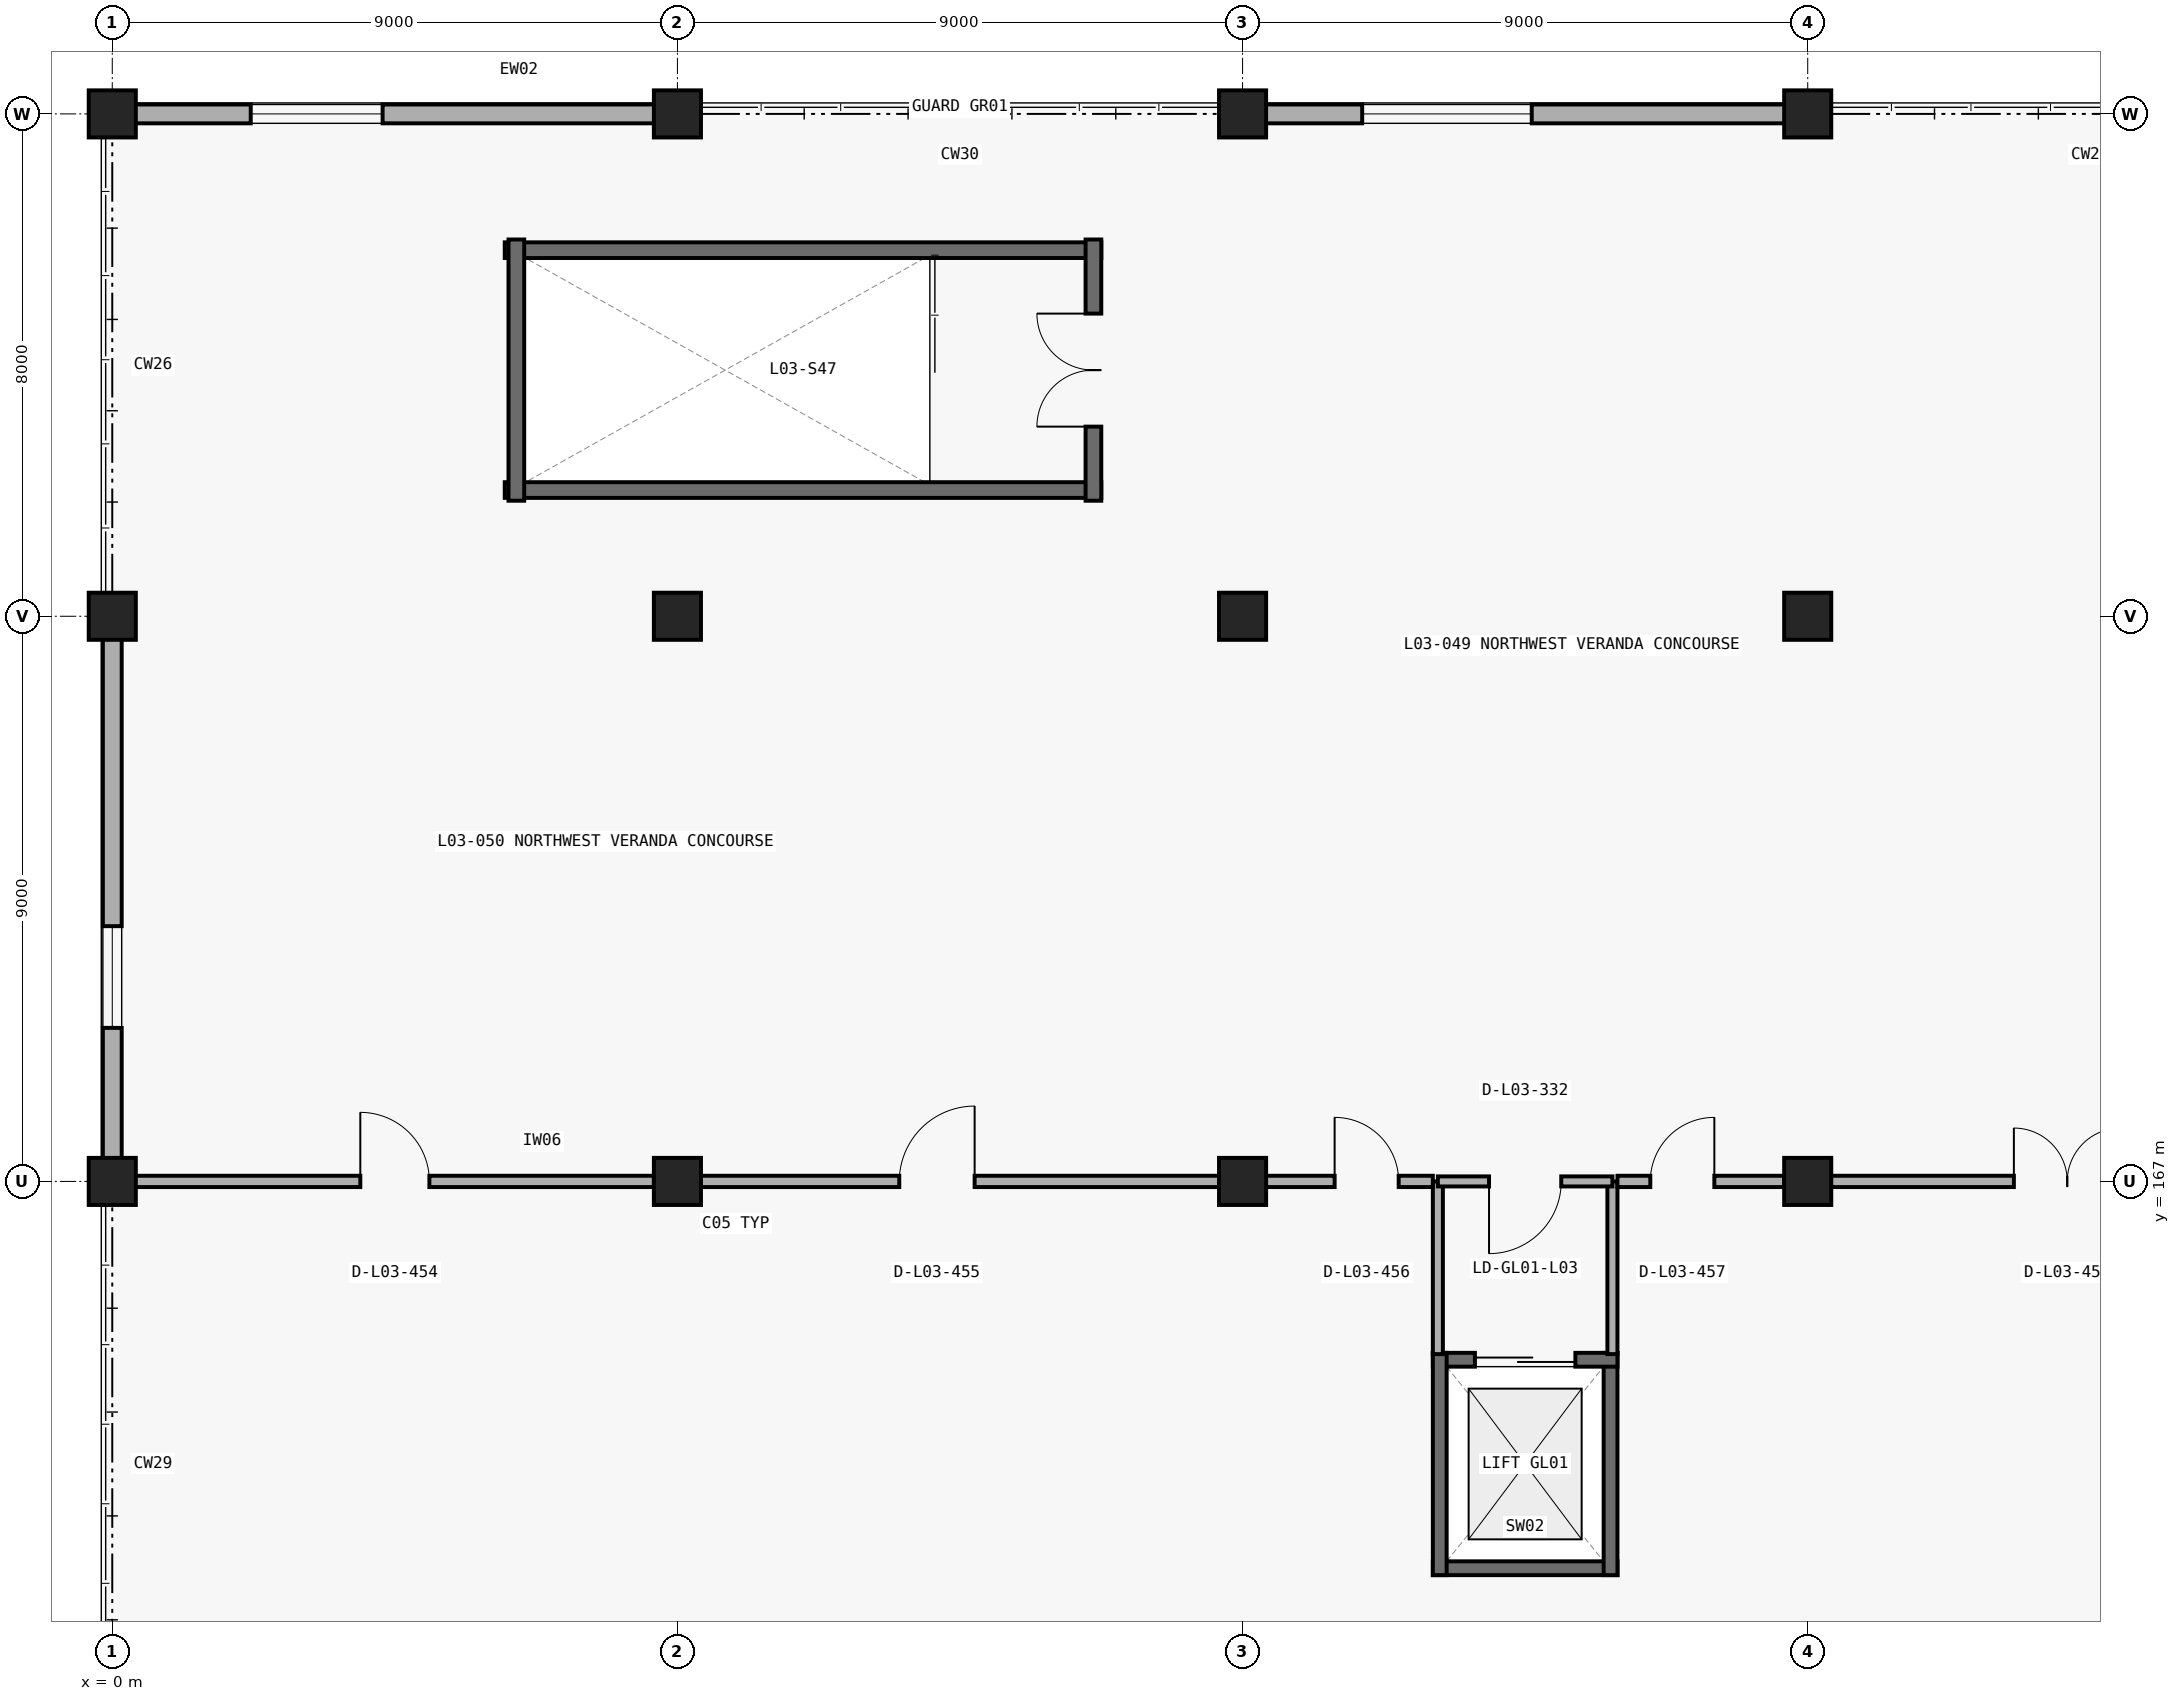
"""IFC4 building model, lengths in metres.
Left out: names, types, materials, properties, quantities, classifications, styles, units other than length and angle.
Written with IfcOpenShell. Run it as: python <this file> out.ifc"""

import sys

from ifc_helpers import new_model, si_unit, direction, frame, frame_2d, origin, origin_2d, place, context, subcontext, project, spatial, rectangle, extrude, element, fill, save


model = new_model("IFC4")
c1 = context("Model", 3, precision=1e-05, world=origin(), true_north=direction((0.0, 1.0)))
c2 = subcontext(c1, "Body", "Model", "MODEL_VIEW")
j1 = project(units=[si_unit("LENGTHUNIT", "METRE"), si_unit("PLANEANGLEUNIT", "RADIAN")], contexts=[c1])
p1 = place(None, origin())
s1 = spatial("IfcSite", under=j1, at=p1, CompositionType="ELEMENT")
p2 = place(p1, origin())
s2 = spatial("IfcBuilding", under=s1, at=p2, CompositionType="ELEMENT")
p3 = place(p2, frame((0.0, 0.0, 15.0)))
s3 = spatial("IfcBuildingStorey", under=s2, at=p3, CompositionType="ELEMENT", Elevation=15.0)
for number, where, z_axis, x_axis in (
    (1, (0.0, 167.0, 0.0), (0.0, 0.0, 1.0), (1.0, 0.0, 0.0)),
    (2, (0.0, 176.0, 0.0), (0.0, 0.0, 1.0), (1.0, 0.0, 0.0)),
    (3, (0.0, 184.0, 0.0), (0.0, 0.0, 1.0), (1.0, 0.0, 0.0)),
    (4, (9.0, 167.0, 0.0), (0.0, 0.0, 1.0), (1.0, 0.0, 0.0)),
    (5, (9.0, 176.0, 0.0), (0.0, 0.0, 1.0), (1.0, 0.0, 0.0)),
    (6, (9.0, 184.0, 0.0), (0.0, 0.0, 1.0), (1.0, 0.0, 0.0)),
    (7, (18.0, 167.0, 0.0), (0.0, 0.0, 1.0), (1.0, 0.0, 0.0)),
    (8, (18.0, 176.0, 0.0), (0.0, 0.0, 1.0), (1.0, 0.0, 0.0)),
    (9, (18.0, 184.0, 0.0), (0.0, 0.0, 1.0), (1.0, 0.0, 0.0)),
    (10, (27.0, 167.0, 0.0), (0.0, 0.0, 1.0), (1.0, 0.0, 0.0)),
    (11, (27.0, 176.0, 0.0), (0.0, 0.0, 1.0), (1.0, 0.0, 0.0)),
    (12, (27.0, 184.0, 0.0), (0.0, 0.0, 1.0), (1.0, 0.0, 0.0)),
):
    element("IfcColumn", number, at=place(p3, frame(where, z_axis=z_axis, x_axis=x_axis)), inside=s3, PredefinedType="COLUMN", context=c2, shape_type="SweptSolid", body=[
        extrude(rectangle(XDim=0.75, YDim=0.75, at=origin_2d()), origin(), (0.0, 0.0, 1.0), 4.8),
    ])
p4 = place(p3, frame((0.0, 167.35, 0.0), z_axis=(0.0, 0.0, 1.0), x_axis=(0.0, 1.0, 0.0)))
e13 = element("IfcWall", 13, at=p4, inside=s3, PredefinedType="STANDARD", context=c2, shape_type="SweptSolid", body=[
    extrude(rectangle(XDim=8.3, YDim=0.3, at=frame_2d((4.15, 0.0))), origin(), (0.0, 0.0, 1.0), 3.857),
])
p5 = place(p4, frame((2.095, 0.0, 0.95)))
e14 = element("IfcOpeningElement", 14, at=p5, cuts=e13, PredefinedType="OPENING", context=c2, shape_type="SweptSolid", body=[
    extrude(rectangle(XDim=1.62, YDim=2.12, at=frame_2d((0.81, 1.06))), frame((0.0, 0.16, 0.0), z_axis=(0.0, -1.0, 0.0), x_axis=(1.0, 0.0, 0.0)), (0.0, 0.0, 1.0), 0.32),
])
p6 = place(p3, frame((0.35, 184.0, 0.0), z_axis=(0.0, 0.0, 1.0), x_axis=(1.0, 0.0, 0.0)))
e15 = element("IfcWall", 15, at=p6, inside=s3, PredefinedType="STANDARD", context=c2, shape_type="SweptSolid", body=[
    extrude(rectangle(XDim=8.3, YDim=0.3, at=frame_2d((4.15, 0.0))), origin(), (0.0, 0.0, 1.0), 3.823),
])
p7 = place(p6, frame((1.855, 0.0, 0.95)))
e16 = element("IfcOpeningElement", 16, at=p7, cuts=e15, PredefinedType="OPENING", context=c2, shape_type="SweptSolid", body=[
    extrude(rectangle(XDim=2.1, YDim=2.1, at=frame_2d((1.05, 1.05))), frame((0.0, 0.16, 0.0), z_axis=(0.0, -1.0, 0.0), x_axis=(1.0, 0.0, 0.0)), (0.0, 0.0, 1.0), 0.32),
])
p8 = place(p3, frame((18.35, 184.0, 0.0), z_axis=(0.0, 0.0, 1.0), x_axis=(1.0, 0.0, 0.0)))
e17 = element("IfcWall", 17, at=p8, inside=s3, PredefinedType="STANDARD", context=c2, shape_type="SweptSolid", body=[
    extrude(rectangle(XDim=8.3, YDim=0.3, at=frame_2d((4.15, 0.0))), origin(), (0.0, 0.0, 1.0), 3.823),
])
p9 = place(p8, frame((1.555, 0.0, 0.95)))
e18 = element("IfcOpeningElement", 18, at=p9, cuts=e17, PredefinedType="OPENING", context=c2, shape_type="SweptSolid", body=[
    extrude(rectangle(XDim=2.7, YDim=2.25, at=frame_2d((1.35, 1.125))), frame((0.0, 0.16, 0.0), z_axis=(0.0, -1.0, 0.0), x_axis=(1.0, 0.0, 0.0)), (0.0, 0.0, 1.0), 0.32),
])
for number, where, z_axis, x_axis in (
    (19, (15.75, 181.83, 0.0), (0.0, 0.0, 1.0), (-1.0, 0.0, 0.0)),
    (20, (6.25, 178.01, 0.0), (0.0, 0.0, 1.0), (1.0, 0.0, 0.0)),
):
    element("IfcWall", number, at=place(p3, frame(where, z_axis=z_axis, x_axis=x_axis)), inside=s3, PredefinedType="SHEAR", context=c2, shape_type="SweptSolid", body=[
        extrude(rectangle(XDim=9.5, YDim=0.25, at=frame_2d((4.75, 0.0))), origin(), (0.0, 0.0, 1.0), 4.54),
    ])
p10 = place(p3, frame((15.625, 177.84, 0.0), z_axis=(0.0, 0.0, 1.0), x_axis=(0.0, 1.0, 0.0)))
e21 = element("IfcWall", 21, at=p10, inside=s3, PredefinedType="SHEAR", context=c2, shape_type="SweptSolid", body=[
    extrude(rectangle(XDim=4.16, YDim=0.25, at=frame_2d((2.08, 0.0))), origin(), (0.0, 0.0, 1.0), 4.54),
])
p11 = place(p10, frame((1.18, 0.0, 0.0)))
e22 = element("IfcOpeningElement", 22, at=p11, cuts=e21, PredefinedType="OPENING", context=c2, shape_type="SweptSolid", body=[
    extrude(rectangle(XDim=1.8, YDim=2.25, at=frame_2d((0.9, 1.125))), frame((0.0, 0.135, 0.0), z_axis=(0.0, -1.0, 0.0), x_axis=(1.0, 0.0, 0.0)), (0.0, 0.0, 1.0), 0.27),
])
p12 = place(p3, frame((6.435, 182.0, 0.0), z_axis=(0.0, 0.0, 1.0), x_axis=(0.0, -1.0, 0.0)))
e23 = element("IfcWall", 23, at=p12, inside=s3, PredefinedType="SHEAR", context=c2, shape_type="SweptSolid", body=[
    extrude(rectangle(XDim=4.16, YDim=0.25, at=frame_2d((2.08, 0.0))), origin(), (0.0, 0.0, 1.0), 4.54),
])
p13 = place(p3, frame((21.03, 160.84, 0.0), z_axis=(0.0, 0.0, 1.0), x_axis=(1.0, 0.0, 0.0)))
e24 = element("IfcWall", 24, at=p13, inside=s3, PredefinedType="SHEAR", context=c2, shape_type="SweptSolid", body=[
    extrude(rectangle(XDim=2.94, YDim=0.22, at=frame_2d((1.47, 0.0))), origin(), (0.0, 0.0, 1.0), 4.54),
])
p14 = place(p3, frame((23.86, 160.73, 0.0), z_axis=(0.0, 0.0, 1.0), x_axis=(0.0, 1.0, 0.0)))
e25 = element("IfcWall", 25, at=p14, inside=s3, PredefinedType="SHEAR", context=c2, shape_type="SweptSolid", body=[
    extrude(rectangle(XDim=3.54, YDim=0.22, at=frame_2d((1.77, 0.0))), origin(), (0.0, 0.0, 1.0), 4.54),
])
p15 = place(p3, frame((23.97, 164.16, 0.0), z_axis=(0.0, 0.0, 1.0), x_axis=(-1.0, 0.0, 0.0)))
e26 = element("IfcWall", 26, at=p15, inside=s3, PredefinedType="SHEAR", context=c2, shape_type="SweptSolid", body=[
    extrude(rectangle(XDim=2.94, YDim=0.22, at=frame_2d((1.47, 0.0))), origin(), (0.0, 0.0, 1.0), 4.54),
])
p16 = place(p15, frame((0.67, 0.0, 0.0)))
e27 = element("IfcOpeningElement", 27, at=p16, cuts=e26, PredefinedType="OPENING", context=c2, shape_type="SweptSolid", body=[
    extrude(rectangle(XDim=1.6, YDim=2.3, at=frame_2d((0.8, 1.15))), frame((0.0, 0.12, 0.0), z_axis=(0.0, -1.0, 0.0), x_axis=(1.0, 0.0, 0.0)), (0.0, 0.0, 1.0), 0.24),
])
p17 = place(p3, frame((21.14, 164.27, 0.0), z_axis=(0.0, 0.0, 1.0), x_axis=(0.0, -1.0, 0.0)))
e28 = element("IfcWall", 28, at=p17, inside=s3, PredefinedType="SHEAR", context=c2, shape_type="SweptSolid", body=[
    extrude(rectangle(XDim=3.54, YDim=0.22, at=frame_2d((1.77, 0.0))), origin(), (0.0, 0.0, 1.0), 4.54),
])
for number, where, z_axis, x_axis in (
    (29, (23.89, 164.25, 0.0), (0.0, 0.0, 1.0), (0.0, 1.0, 0.0)),
    (30, (21.11, 164.25, 0.0), (0.0, 0.0, 1.0), (0.0, 1.0, 0.0)),
):
    element("IfcWall", number, at=place(p3, frame(where, z_axis=z_axis, x_axis=x_axis)), inside=s3, PredefinedType="PARTITIONING", context=c2, shape_type="SweptSolid", body=[
        extrude(rectangle(XDim=2.75, YDim=0.16, at=frame_2d((1.375, 0.0))), origin(), (0.0, 0.0, 1.0), 3.823),
    ])
p18 = place(p3, frame((23.89, 167.0, 0.0), z_axis=(0.0, 0.0, 1.0), x_axis=(-1.0, 0.0, 0.0)))
e31 = element("IfcWall", 31, at=p18, inside=s3, PredefinedType="PARTITIONING", context=c2, shape_type="SweptSolid", body=[
    extrude(rectangle(XDim=2.78, YDim=0.16, at=frame_2d((1.39, 0.0))), origin(), (0.0, 0.0, 1.0), 3.823),
])
p19 = place(p18, frame((0.815, 0.0, 0.0)))
e32 = element("IfcOpeningElement", 32, at=p19, cuts=e31, PredefinedType="OPENING", context=c2, shape_type="SweptSolid", body=[
    extrude(rectangle(XDim=1.15, YDim=2.2, at=frame_2d((0.575, 1.1))), frame((0.0, 0.09, 0.0), z_axis=(0.0, -1.0, 0.0), x_axis=(1.0, 0.0, 0.0)), (0.0, 0.0, 1.0), 0.18),
])
p20 = place(p3, frame((0.36, 167.0, 0.0), z_axis=(0.0, 0.0, 1.0), x_axis=(1.0, 0.0, 0.0)))
e33 = element("IfcWall", 33, at=p20, inside=s3, PredefinedType="PARTITIONING", context=c2, shape_type="SweptSolid", body=[
    extrude(rectangle(XDim=8.28, YDim=0.18, at=frame_2d((4.14, 0.0))), origin(), (0.0, 0.0, 1.0), 3.823),
])
p21 = place(p20, frame((3.59, 0.0, 0.0)))
e34 = element("IfcOpeningElement", 34, at=p21, cuts=e33, PredefinedType="OPENING", context=c2, shape_type="SweptSolid", body=[
    extrude(rectangle(XDim=1.1, YDim=2.15, at=frame_2d((0.55, 1.075))), frame((0.0, 0.1, 0.0), z_axis=(0.0, -1.0, 0.0), x_axis=(1.0, 0.0, 0.0)), (0.0, 0.0, 1.0), 0.2),
])
p22 = place(p3, frame((8.625, 167.0, 0.0), z_axis=(0.0, 0.0, 1.0), x_axis=(1.0, 0.0, 0.0)))
e35 = element("IfcWall", 35, at=p22, inside=s3, PredefinedType="PARTITIONING", context=c2, shape_type="SweptSolid", body=[
    extrude(rectangle(XDim=9.015, YDim=0.18, at=frame_2d((4.507, 0.0))), origin(), (0.0, 0.0, 1.0), 3.823),
])
p23 = place(p22, frame((3.908, 0.0, 0.0)))
e36 = element("IfcOpeningElement", 36, at=p23, cuts=e35, PredefinedType="OPENING", context=c2, shape_type="SweptSolid", body=[
    extrude(rectangle(XDim=1.2, YDim=2.25, at=frame_2d((0.6, 1.125))), frame((0.0, 0.1, 0.0), z_axis=(0.0, -1.0, 0.0), x_axis=(1.0, 0.0, 0.0)), (0.0, 0.0, 1.0), 0.2),
])
p24 = place(p3, frame((17.625, 167.0, 0.0), z_axis=(0.0, 0.0, 1.0), x_axis=(1.0, 0.0, 0.0)))
e37 = element("IfcWall", 37, at=p24, inside=s3, PredefinedType="PARTITIONING", context=c2, shape_type="SweptSolid", body=[
    extrude(rectangle(XDim=3.405, YDim=0.18, at=frame_2d((1.703, 0.0))), origin(), (0.0, 0.0, 1.0), 3.823),
])
p25 = place(p24, frame((1.841, 0.0, 0.0)))
e38 = element("IfcOpeningElement", 38, at=p25, cuts=e37, PredefinedType="OPENING", context=c2, shape_type="SweptSolid", body=[
    extrude(rectangle(XDim=1.02, YDim=2.2, at=frame_2d((0.51, 1.1))), frame((0.0, 0.1, 0.0), z_axis=(0.0, -1.0, 0.0), x_axis=(1.0, 0.0, 0.0)), (0.0, 0.0, 1.0), 0.2),
])
p26 = place(p3, frame((23.97, 167.0, 0.0), z_axis=(0.0, 0.0, 1.0), x_axis=(1.0, 0.0, 0.0)))
e39 = element("IfcWall", 39, at=p26, inside=s3, PredefinedType="PARTITIONING", context=c2, shape_type="SweptSolid", body=[
    extrude(rectangle(XDim=2.67, YDim=0.18, at=frame_2d((1.335, 0.0))), origin(), (0.0, 0.0, 1.0), 3.823),
])
p27 = place(p26, frame((0.523, 0.0, 0.0)))
e40 = element("IfcOpeningElement", 40, at=p27, cuts=e39, PredefinedType="OPENING", context=c2, shape_type="SweptSolid", body=[
    extrude(rectangle(XDim=1.02, YDim=2.2, at=frame_2d((0.51, 1.1))), frame((0.0, 0.1, 0.0), z_axis=(0.0, -1.0, 0.0), x_axis=(1.0, 0.0, 0.0)), (0.0, 0.0, 1.0), 0.2),
])
p28 = place(p3, frame((26.625, 167.0, 0.0), z_axis=(0.0, 0.0, 1.0), x_axis=(1.0, 0.0, 0.0)))
e41 = element("IfcWall", 41, at=p28, inside=s3, PredefinedType="PARTITIONING", context=c2, shape_type="SweptSolid", body=[
    extrude(rectangle(XDim=9.015, YDim=0.18, at=frame_2d((4.507, 0.0))), origin(), (0.0, 0.0, 1.0), 3.823),
])
p29 = place(p28, frame((3.658, 0.0, 0.0)))
e42 = element("IfcOpeningElement", 42, at=p29, cuts=e41, PredefinedType="OPENING", context=c2, shape_type="SweptSolid", body=[
    extrude(rectangle(XDim=1.7, YDim=2.2, at=frame_2d((0.85, 1.1))), frame((0.0, 0.1, 0.0), z_axis=(0.0, -1.0, 0.0), x_axis=(1.0, 0.0, 0.0)), (0.0, 0.0, 1.0), 0.2),
])
p30 = place(p5, origin())
e43 = element("IfcWindow", 43, at=p30, inside=s3, PartitioningType="SINGLE_PANEL", PredefinedType="WINDOW", context=c2, shape_type="SweptSolid", body=[
    extrude(rectangle(XDim=1.62, YDim=2.12, at=frame_2d((0.81, 1.06))), frame((0.0, 0.03, 0.0), z_axis=(0.0, -1.0, 0.0), x_axis=(1.0, 0.0, 0.0)), (0.0, 0.0, 1.0), 0.06),
])
fill(e14, e43)
p31 = place(p7, origin())
e44 = element("IfcWindow", 44, at=p31, inside=s3, PartitioningType="SINGLE_PANEL", PredefinedType="WINDOW", context=c2, shape_type="SweptSolid", body=[
    extrude(rectangle(XDim=2.1, YDim=2.1, at=frame_2d((1.05, 1.05))), frame((0.0, 0.03, 0.0), z_axis=(0.0, -1.0, 0.0), x_axis=(1.0, 0.0, 0.0)), (0.0, 0.0, 1.0), 0.06),
])
fill(e16, e44)
p32 = place(p9, origin())
e45 = element("IfcWindow", 45, at=p32, inside=s3, PartitioningType="SINGLE_PANEL", PredefinedType="WINDOW", context=c2, shape_type="SweptSolid", body=[
    extrude(rectangle(XDim=2.7, YDim=2.25, at=frame_2d((1.35, 1.125))), frame((0.0, 0.03, 0.0), z_axis=(0.0, -1.0, 0.0), x_axis=(1.0, 0.0, 0.0)), (0.0, 0.0, 1.0), 0.06),
])
fill(e18, e45)
p33 = place(p11, origin())
e46 = element("IfcDoor", 46, at=p33, inside=s3, OperationType="DOUBLE_DOOR_SINGLE_SWING", PredefinedType="DOOR", context=c2, shape_type="SweptSolid", body=[
    extrude(rectangle(XDim=1.8, YDim=2.25, at=frame_2d((0.9, 1.125))), frame((0.0, 0.025, 0.0), z_axis=(0.0, -1.0, 0.0), x_axis=(1.0, 0.0, 0.0)), (0.0, 0.0, 1.0), 0.05),
])
fill(e22, e46)
p34 = place(p16, origin())
e47 = element("IfcDoor", 47, at=p34, inside=s3, OperationType="SLIDING_TO_LEFT", PredefinedType="DOOR", context=c2, shape_type="SweptSolid", body=[
    extrude(rectangle(XDim=1.6, YDim=2.3, at=frame_2d((0.8, 1.15))), frame((0.0, 0.025, 0.0), z_axis=(0.0, -1.0, 0.0), x_axis=(1.0, 0.0, 0.0)), (0.0, 0.0, 1.0), 0.05),
])
fill(e27, e47)
p35 = place(p19, origin())
e48 = element("IfcDoor", 48, at=p35, inside=s3, OperationType="SINGLE_SWING_RIGHT", PredefinedType="DOOR", context=c2, shape_type="SweptSolid", body=[
    extrude(rectangle(XDim=1.15, YDim=2.2, at=frame_2d((0.575, 1.1))), frame((0.0, 0.025, 0.0), z_axis=(0.0, -1.0, 0.0), x_axis=(1.0, 0.0, 0.0)), (0.0, 0.0, 1.0), 0.05),
])
fill(e32, e48)
p36 = place(p21, origin())
e49 = element("IfcDoor", 49, at=p36, inside=s3, OperationType="SINGLE_SWING_LEFT", PredefinedType="DOOR", context=c2, shape_type="SweptSolid", body=[
    extrude(rectangle(XDim=1.1, YDim=2.15, at=frame_2d((0.55, 1.075))), frame((0.0, 0.025, 0.0), z_axis=(0.0, -1.0, 0.0), x_axis=(1.0, 0.0, 0.0)), (0.0, 0.0, 1.0), 0.05),
])
fill(e34, e49)
p37 = place(p23, origin())
e50 = element("IfcDoor", 50, at=p37, inside=s3, OperationType="SINGLE_SWING_RIGHT", PredefinedType="DOOR", context=c2, shape_type="SweptSolid", body=[
    extrude(rectangle(XDim=1.2, YDim=2.25, at=frame_2d((0.6, 1.125))), frame((0.0, 0.025, 0.0), z_axis=(0.0, -1.0, 0.0), x_axis=(1.0, 0.0, 0.0)), (0.0, 0.0, 1.0), 0.05),
])
fill(e36, e50)
p38 = place(p25, origin())
e51 = element("IfcDoor", 51, at=p38, inside=s3, OperationType="SINGLE_SWING_LEFT", PredefinedType="DOOR", context=c2, shape_type="SweptSolid", body=[
    extrude(rectangle(XDim=1.02, YDim=2.2, at=frame_2d((0.51, 1.1))), frame((0.0, 0.025, 0.0), z_axis=(0.0, -1.0, 0.0), x_axis=(1.0, 0.0, 0.0)), (0.0, 0.0, 1.0), 0.05),
])
fill(e38, e51)
p39 = place(p27, origin())
e52 = element("IfcDoor", 52, at=p39, inside=s3, OperationType="SINGLE_SWING_RIGHT", PredefinedType="DOOR", context=c2, shape_type="SweptSolid", body=[
    extrude(rectangle(XDim=1.02, YDim=2.2, at=frame_2d((0.51, 1.1))), frame((0.0, 0.025, 0.0), z_axis=(0.0, -1.0, 0.0), x_axis=(1.0, 0.0, 0.0)), (0.0, 0.0, 1.0), 0.05),
])
fill(e40, e52)
p40 = place(p29, origin())
e53 = element("IfcDoor", 53, at=p40, inside=s3, OperationType="DOUBLE_DOOR_SINGLE_SWING", PredefinedType="DOOR", context=c2, shape_type="SweptSolid", body=[
    extrude(rectangle(XDim=1.7, YDim=2.2, at=frame_2d((0.85, 1.1))), frame((0.0, 0.025, 0.0), z_axis=(0.0, -1.0, 0.0), x_axis=(1.0, 0.0, 0.0)), (0.0, 0.0, 1.0), 0.05),
])
fill(e42, e53)
save(model, sys.argv[1])
